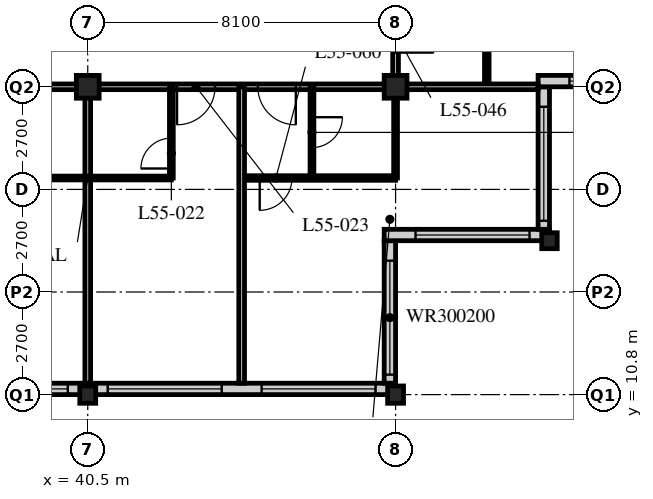
"""IFC4 building model, lengths in metres.
Left out: names, types, materials, properties, quantities, classifications, styles, units other than length and angle.
Written with IfcOpenShell. Run it as: python <this file> out.ifc"""

import sys

from ifc_helpers import new_model, si_unit, direction, frame, frame_2d, origin, origin_2d, place, context, subcontext, project, spatial, rectangle, hollow_rectangle, i_section, extrude, element, fill, save


model = new_model("IFC4")
c1 = context("Model", 3, precision=1e-05, world=origin(), true_north=direction((0.0, 1.0)))
c2 = subcontext(c1, "Body", "Model", "MODEL_VIEW")
j1 = project(units=[si_unit("LENGTHUNIT", "METRE"), si_unit("PLANEANGLEUNIT", "RADIAN")], contexts=[c1])
p1 = place(None, origin())
s1 = spatial("IfcSite", under=j1, at=p1, CompositionType="ELEMENT")
p2 = place(p1, origin())
s2 = spatial("IfcBuilding", under=s1, at=p2, CompositionType="ELEMENT")
p3 = place(p2, frame((0.0, 0.0, 213.6)))
s3 = spatial("IfcBuildingStorey", under=s2, at=p3, CompositionType="ELEMENT", Elevation=213.6)
p4 = place(p3, frame((40.5, 10.8, 0.0), z_axis=(0.0, 0.0, 1.0), x_axis=(1.0, 0.0, 0.0)))
e1 = element("IfcColumn", 1, at=p4, inside=s3, PredefinedType="COLUMN", context=c2, shape_type="SweptSolid", body=[
    extrude(i_section(OverallWidth=0.418, OverallDepth=0.456, WebThickness=0.042, FlangeThickness=0.067, FilletRadius=0.015, at=origin_2d()), origin(), (0.0, 0.0, 1.0), 3.6),
])
p5 = place(p3, frame((40.5, 18.9, 0.0), z_axis=(0.0, 0.0, 1.0), x_axis=(1.0, 0.0, 0.0)))
e2 = element("IfcColumn", 2, at=p5, inside=s3, PredefinedType="COLUMN", context=c2, shape_type="SweptSolid", body=[
    extrude(hollow_rectangle(XDim=0.6, YDim=0.6, WallThickness=0.05, at=origin_2d()), origin(), (0.0, 0.0, 1.0), 3.6),
])
p6 = place(p3, frame((48.6, 10.8, 0.0), z_axis=(0.0, 0.0, 1.0), x_axis=(1.0, 0.0, 0.0)))
e3 = element("IfcColumn", 3, at=p6, inside=s3, PredefinedType="COLUMN", context=c2, shape_type="SweptSolid", body=[
    extrude(i_section(OverallWidth=0.418, OverallDepth=0.456, WebThickness=0.042, FlangeThickness=0.067, FilletRadius=0.015, at=origin_2d()), origin(), (0.0, 0.0, 1.0), 3.6),
])
p7 = place(p3, frame((48.6, 18.9, 0.0), z_axis=(0.0, 0.0, 1.0), x_axis=(1.0, 0.0, 0.0)))
e4 = element("IfcColumn", 4, at=p7, inside=s3, PredefinedType="COLUMN", context=c2, shape_type="SweptSolid", body=[
    extrude(hollow_rectangle(XDim=0.6, YDim=0.6, WallThickness=0.05, at=origin_2d()), origin(), (0.0, 0.0, 1.0), 3.6),
])
p8 = place(p3, frame((52.65, 14.85, 0.0), z_axis=(0.0, 0.0, 1.0), x_axis=(1.0, 0.0, 0.0)))
e5 = element("IfcColumn", 5, at=p8, inside=s3, PredefinedType="COLUMN", context=c2, shape_type="SweptSolid", body=[
    extrude(i_section(OverallWidth=0.407, OverallDepth=0.419, WebThickness=0.031, FlangeThickness=0.049, FilletRadius=0.015, at=origin_2d()), origin(), (0.0, 0.0, 1.0), 3.6),
])
p9 = place(p3, frame((8.4, 10.95, 0.0), z_axis=(0.0, 0.0, 1.0), x_axis=(1.0, 0.0, 0.0)))
e6 = element("IfcWall", 6, at=p9, inside=s3, PredefinedType="SOLIDWALL", context=c2, shape_type="SweptSolid", body=[
    extrude(rectangle(XDim=40.2, YDim=0.3, at=frame_2d((20.1, 0.0))), origin(), (0.0, 0.0, 1.0), 3.39),
])
p10 = place(p9, frame((0.225, 0.0, 0.6)))
e7 = element("IfcOpeningElement", 7, at=p10, cuts=e6, PredefinedType="OPENING", context=c2, shape_type="SweptSolid", body=[
    extrude(rectangle(XDim=3.0, YDim=2.4, at=frame_2d((1.5, 1.2))), frame((0.0, 0.16, 0.0), z_axis=(0.0, -1.0, 0.0), x_axis=(1.0, 0.0, 0.0)), (0.0, 0.0, 1.0), 0.32),
])
p11 = place(p9, frame((4.275, 0.0, 0.6)))
e8 = element("IfcOpeningElement", 8, at=p11, cuts=e6, PredefinedType="OPENING", context=c2, shape_type="SweptSolid", body=[
    extrude(rectangle(XDim=3.0, YDim=2.4, at=frame_2d((1.5, 1.2))), frame((0.0, 0.16, 0.0), z_axis=(0.0, -1.0, 0.0), x_axis=(1.0, 0.0, 0.0)), (0.0, 0.0, 1.0), 0.32),
])
p12 = place(p9, frame((8.325, 0.0, 0.6)))
e9 = element("IfcOpeningElement", 9, at=p12, cuts=e6, PredefinedType="OPENING", context=c2, shape_type="SweptSolid", body=[
    extrude(rectangle(XDim=3.0, YDim=2.4, at=frame_2d((1.5, 1.2))), frame((0.0, 0.16, 0.0), z_axis=(0.0, -1.0, 0.0), x_axis=(1.0, 0.0, 0.0)), (0.0, 0.0, 1.0), 0.32),
])
p13 = place(p9, frame((12.375, 0.0, 0.6)))
e10 = element("IfcOpeningElement", 10, at=p13, cuts=e6, PredefinedType="OPENING", context=c2, shape_type="SweptSolid", body=[
    extrude(rectangle(XDim=3.0, YDim=2.4, at=frame_2d((1.5, 1.2))), frame((0.0, 0.16, 0.0), z_axis=(0.0, -1.0, 0.0), x_axis=(1.0, 0.0, 0.0)), (0.0, 0.0, 1.0), 0.32),
])
p14 = place(p9, frame((16.425, 0.0, 0.6)))
e11 = element("IfcOpeningElement", 11, at=p14, cuts=e6, PredefinedType="OPENING", context=c2, shape_type="SweptSolid", body=[
    extrude(rectangle(XDim=3.0, YDim=2.4, at=frame_2d((1.5, 1.2))), frame((0.0, 0.16, 0.0), z_axis=(0.0, -1.0, 0.0), x_axis=(1.0, 0.0, 0.0)), (0.0, 0.0, 1.0), 0.32),
])
p15 = place(p9, frame((20.475, 0.0, 0.6)))
e12 = element("IfcOpeningElement", 12, at=p15, cuts=e6, PredefinedType="OPENING", context=c2, shape_type="SweptSolid", body=[
    extrude(rectangle(XDim=3.0, YDim=2.4, at=frame_2d((1.5, 1.2))), frame((0.0, 0.16, 0.0), z_axis=(0.0, -1.0, 0.0), x_axis=(1.0, 0.0, 0.0)), (0.0, 0.0, 1.0), 0.32),
])
p16 = place(p9, frame((24.525, 0.0, 0.6)))
e13 = element("IfcOpeningElement", 13, at=p16, cuts=e6, PredefinedType="OPENING", context=c2, shape_type="SweptSolid", body=[
    extrude(rectangle(XDim=3.0, YDim=2.4, at=frame_2d((1.5, 1.2))), frame((0.0, 0.16, 0.0), z_axis=(0.0, -1.0, 0.0), x_axis=(1.0, 0.0, 0.0)), (0.0, 0.0, 1.0), 0.32),
])
p17 = place(p9, frame((28.575, 0.0, 0.6)))
e14 = element("IfcOpeningElement", 14, at=p17, cuts=e6, PredefinedType="OPENING", context=c2, shape_type="SweptSolid", body=[
    extrude(rectangle(XDim=3.0, YDim=2.4, at=frame_2d((1.5, 1.2))), frame((0.0, 0.16, 0.0), z_axis=(0.0, -1.0, 0.0), x_axis=(1.0, 0.0, 0.0)), (0.0, 0.0, 1.0), 0.32),
])
p18 = place(p9, frame((32.625, 0.0, 0.6)))
e15 = element("IfcOpeningElement", 15, at=p18, cuts=e6, PredefinedType="OPENING", context=c2, shape_type="SweptSolid", body=[
    extrude(rectangle(XDim=3.0, YDim=2.4, at=frame_2d((1.5, 1.2))), frame((0.0, 0.16, 0.0), z_axis=(0.0, -1.0, 0.0), x_axis=(1.0, 0.0, 0.0)), (0.0, 0.0, 1.0), 0.32),
])
p19 = place(p9, frame((36.675, 0.0, 0.6)))
e16 = element("IfcOpeningElement", 16, at=p19, cuts=e6, PredefinedType="OPENING", context=c2, shape_type="SweptSolid", body=[
    extrude(rectangle(XDim=3.0, YDim=2.4, at=frame_2d((1.5, 1.2))), frame((0.0, 0.16, 0.0), z_axis=(0.0, -1.0, 0.0), x_axis=(1.0, 0.0, 0.0)), (0.0, 0.0, 1.0), 0.32),
])
p20 = place(p3, frame((48.45, 11.1, 0.0), z_axis=(0.0, 0.0, 1.0), x_axis=(0.0, 1.0, 0.0)))
e17 = element("IfcWall", 17, at=p20, inside=s3, PredefinedType="SOLIDWALL", context=c2, shape_type="SweptSolid", body=[
    extrude(rectangle(XDim=3.75, YDim=0.3, at=frame_2d((1.875, 0.0))), origin(), (0.0, 0.0, 1.0), 3.39),
])
p21 = place(p20, frame((0.225, 0.0, 0.6)))
e18 = element("IfcOpeningElement", 18, at=p21, cuts=e17, PredefinedType="OPENING", context=c2, shape_type="SweptSolid", body=[
    extrude(rectangle(XDim=3.0, YDim=2.0, at=frame_2d((1.5, 1.0))), frame((0.0, 0.16, 0.0), z_axis=(0.0, -1.0, 0.0), x_axis=(1.0, 0.0, 0.0)), (0.0, 0.0, 1.0), 0.32),
])
p22 = place(p3, frame((48.3, 15.0, 0.0), z_axis=(0.0, 0.0, 1.0), x_axis=(1.0, 0.0, 0.0)))
e19 = element("IfcWall", 19, at=p22, inside=s3, PredefinedType="SOLIDWALL", context=c2, shape_type="SweptSolid", body=[
    extrude(rectangle(XDim=4.35, YDim=0.3, at=frame_2d((2.175, 0.0))), origin(), (0.0, 0.0, 1.0), 3.39),
])
p23 = place(p22, frame((0.825, 0.0, 0.6)))
e20 = element("IfcOpeningElement", 20, at=p23, cuts=e19, PredefinedType="OPENING", context=c2, shape_type="SweptSolid", body=[
    extrude(rectangle(XDim=3.0, YDim=2.0, at=frame_2d((1.5, 1.0))), frame((0.0, 0.16, 0.0), z_axis=(0.0, -1.0, 0.0), x_axis=(1.0, 0.0, 0.0)), (0.0, 0.0, 1.0), 0.32),
])
p24 = place(p3, frame((52.5, 15.15, 0.0), z_axis=(0.0, 0.0, 1.0), x_axis=(0.0, 1.0, 0.0)))
e21 = element("IfcWall", 21, at=p24, inside=s3, PredefinedType="SOLIDWALL", context=c2, shape_type="SweptSolid", body=[
    extrude(rectangle(XDim=3.75, YDim=0.3, at=frame_2d((1.875, 0.0))), origin(), (0.0, 0.0, 1.0), 3.39),
])
p25 = place(p24, frame((0.225, 0.0, 0.6)))
e22 = element("IfcOpeningElement", 22, at=p25, cuts=e21, PredefinedType="OPENING", context=c2, shape_type="SweptSolid", body=[
    extrude(rectangle(XDim=3.0, YDim=2.0, at=frame_2d((1.5, 1.0))), frame((0.0, 0.16, 0.0), z_axis=(0.0, -1.0, 0.0), x_axis=(1.0, 0.0, 0.0)), (0.0, 0.0, 1.0), 0.32),
])
p26 = place(p3, frame((52.35, 19.05, 0.0), z_axis=(0.0, 0.0, 1.0), x_axis=(1.0, 0.0, 0.0)))
e23 = element("IfcWall", 23, at=p26, inside=s3, PredefinedType="SOLIDWALL", context=c2, shape_type="SweptSolid", body=[
    extrude(rectangle(XDim=4.35, YDim=0.3, at=frame_2d((2.175, 0.0))), origin(), (0.0, 0.0, 1.0), 3.39),
])
p27 = place(p26, frame((0.825, 0.0, 0.6)))
e24 = element("IfcOpeningElement", 24, at=p27, cuts=e23, PredefinedType="OPENING", context=c2, shape_type="SweptSolid", body=[
    extrude(rectangle(XDim=3.0, YDim=2.0, at=frame_2d((1.5, 1.0))), frame((0.0, 0.16, 0.0), z_axis=(0.0, -1.0, 0.0), x_axis=(1.0, 0.0, 0.0)), (0.0, 0.0, 1.0), 0.32),
])
p28 = place(p3, frame((12.15, 18.9, 0.0), z_axis=(0.0, 0.0, 1.0), x_axis=(1.0, 0.0, 0.0)))
e25 = element("IfcWall", 25, at=p28, inside=s3, PredefinedType="PARTITIONING", context=c2, shape_type="SweptSolid", body=[
    extrude(rectangle(XDim=36.45, YDim=0.15, at=frame_2d((18.225, 0.0))), origin(), (0.0, 0.0, 1.0), 2.778),
])
p29 = place(p28, frame((4.95, 0.0, 0.0)))
e26 = element("IfcOpeningElement", 26, at=p29, cuts=e25, PredefinedType="OPENING", context=c2, shape_type="SweptSolid", body=[
    extrude(rectangle(XDim=1.0, YDim=2.1, at=frame_2d((0.5, 1.05))), frame((0.0, 0.085, 0.0), z_axis=(0.0, -1.0, 0.0), x_axis=(1.0, 0.0, 0.0)), (0.0, 0.0, 1.0), 0.17),
])
p30 = place(p28, frame((22.6, 0.0, 0.0)))
e27 = element("IfcOpeningElement", 27, at=p30, cuts=e25, PredefinedType="OPENING", context=c2, shape_type="SweptSolid", body=[
    extrude(rectangle(XDim=1.0, YDim=2.1, at=frame_2d((0.5, 1.05))), frame((0.0, 0.085, 0.0), z_axis=(0.0, -1.0, 0.0), x_axis=(1.0, 0.0, 0.0)), (0.0, 0.0, 1.0), 0.17),
])
p31 = place(p28, frame((25.0, 0.0, 0.0)))
e28 = element("IfcOpeningElement", 28, at=p31, cuts=e25, PredefinedType="OPENING", context=c2, shape_type="SweptSolid", body=[
    extrude(rectangle(XDim=1.0, YDim=2.1, at=frame_2d((0.5, 1.05))), frame((0.0, 0.085, 0.0), z_axis=(0.0, -1.0, 0.0), x_axis=(1.0, 0.0, 0.0)), (0.0, 0.0, 1.0), 0.17),
])
p32 = place(p28, frame((30.7, 0.0, 0.0)))
e29 = element("IfcOpeningElement", 29, at=p32, cuts=e25, PredefinedType="OPENING", context=c2, shape_type="SweptSolid", body=[
    extrude(rectangle(XDim=1.0, YDim=2.1, at=frame_2d((0.5, 1.05))), frame((0.0, 0.085, 0.0), z_axis=(0.0, -1.0, 0.0), x_axis=(1.0, 0.0, 0.0)), (0.0, 0.0, 1.0), 0.17),
])
p33 = place(p28, frame((1.525, 0.0, 0.0)))
e30 = element("IfcOpeningElement", 30, at=p33, cuts=e25, PredefinedType="OPENING", context=c2, shape_type="SweptSolid", body=[
    extrude(rectangle(XDim=1.0, YDim=2.1, at=frame_2d((0.5, 1.05))), frame((0.0, 0.085, 0.0), z_axis=(0.0, -1.0, 0.0), x_axis=(1.0, 0.0, 0.0)), (0.0, 0.0, 1.0), 0.17),
])
p34 = place(p28, frame((32.825, 0.0, 0.0)))
e31 = element("IfcOpeningElement", 31, at=p34, cuts=e25, PredefinedType="OPENING", context=c2, shape_type="SweptSolid", body=[
    extrude(rectangle(XDim=1.0, YDim=2.1, at=frame_2d((0.5, 1.05))), frame((0.0, 0.085, 0.0), z_axis=(0.0, -1.0, 0.0), x_axis=(1.0, 0.0, 0.0)), (0.0, 0.0, 1.0), 0.17),
])
p35 = place(p3, frame((48.6, 18.9, 0.0), z_axis=(0.0, 0.0, 1.0), x_axis=(0.0, 1.0, 0.0)))
e32 = element("IfcWall", 32, at=p35, inside=s3, PredefinedType="PARTITIONING", context=c2, shape_type="SweptSolid", body=[
    extrude(rectangle(XDim=24.3, YDim=0.15, at=frame_2d((12.15, 0.0))), origin(), (0.0, 0.0, 1.0), 2.778),
])
p36 = place(p35, frame((0.9, 0.0, 0.0)))
e33 = element("IfcOpeningElement", 33, at=p36, cuts=e32, PredefinedType="OPENING", context=c2, shape_type="SweptSolid", body=[
    extrude(rectangle(XDim=1.0, YDim=2.1, at=frame_2d((0.5, 1.05))), frame((0.0, 0.085, 0.0), z_axis=(0.0, -1.0, 0.0), x_axis=(1.0, 0.0, 0.0)), (0.0, 0.0, 1.0), 0.17),
])
p37 = place(p35, frame((20.95, 0.0, 0.0)))
e34 = element("IfcOpeningElement", 34, at=p37, cuts=e32, PredefinedType="OPENING", context=c2, shape_type="SweptSolid", body=[
    extrude(rectangle(XDim=1.0, YDim=2.1, at=frame_2d((0.5, 1.05))), frame((0.0, 0.085, 0.0), z_axis=(0.0, -1.0, 0.0), x_axis=(1.0, 0.0, 0.0)), (0.0, 0.0, 1.0), 0.17),
])
p38 = place(p3, frame((38.3, 16.5, 0.0), z_axis=(0.0, 0.0, 1.0), x_axis=(1.0, 0.0, 0.0)))
e35 = element("IfcWall", 35, at=p38, inside=s3, PredefinedType="PARTITIONING", context=c2, shape_type="SweptSolid", body=[
    extrude(rectangle(XDim=4.4, YDim=0.1, at=frame_2d((2.2, 0.0))), origin(), (0.0, 0.0, 1.0), 3.39),
])
p39 = place(p3, frame((40.5, 18.9, 0.0), z_axis=(0.0, 0.0, 1.0), x_axis=(0.0, -1.0, 0.0)))
e36 = element("IfcWall", 36, at=p39, inside=s3, PredefinedType="PARTITIONING", context=c2, shape_type="SweptSolid", body=[
    extrude(rectangle(XDim=7.8, YDim=0.15, at=frame_2d((3.9, 0.0))), origin(), (0.0, 0.0, 1.0), 2.778),
])
p40 = place(p3, frame((42.7, 18.9, 0.0), z_axis=(0.0, 0.0, 1.0), x_axis=(0.0, -1.0, 0.0)))
e37 = element("IfcWall", 37, at=p40, inside=s3, PredefinedType="PARTITIONING", context=c2, shape_type="SweptSolid", body=[
    extrude(rectangle(XDim=2.4, YDim=0.1, at=frame_2d((1.2, 0.0))), origin(), (0.0, 0.0, 1.0), 3.39),
])
p41 = place(p40, frame((1.35, 0.0, 0.0)))
e38 = element("IfcOpeningElement", 38, at=p41, cuts=e37, PredefinedType="OPENING", context=c2, shape_type="SweptSolid", body=[
    extrude(rectangle(XDim=0.8, YDim=2.1, at=frame_2d((0.4, 1.05))), frame((0.0, 0.06, 0.0), z_axis=(0.0, -1.0, 0.0), x_axis=(1.0, 0.0, 0.0)), (0.0, 0.0, 1.0), 0.12),
])
p42 = place(p3, frame((51.0, 18.9, 0.0), z_axis=(0.0, 0.0, 1.0), x_axis=(0.0, 1.0, 0.0)))
e39 = element("IfcWall", 39, at=p42, inside=s3, PredefinedType="PARTITIONING", context=c2, shape_type="SweptSolid", body=[
    extrude(rectangle(XDim=20.25, YDim=0.12, at=frame_2d((10.125, 0.0))), origin(), (0.0, 0.0, 1.0), 3.39),
])
p43 = place(p42, frame((0.975, 0.0, 0.0)))
e40 = element("IfcOpeningElement", 40, at=p43, cuts=e39, PredefinedType="OPENING", context=c2, shape_type="SweptSolid", body=[
    extrude(rectangle(XDim=0.85, YDim=2.1, at=frame_2d((0.425, 1.05))), frame((0.0, 0.07, 0.0), z_axis=(0.0, -1.0, 0.0), x_axis=(1.0, 0.0, 0.0)), (0.0, 0.0, 1.0), 0.14),
])
p44 = place(p42, frame((8.425, 0.0, 0.0)))
e41 = element("IfcOpeningElement", 41, at=p44, cuts=e39, PredefinedType="OPENING", context=c2, shape_type="SweptSolid", body=[
    extrude(rectangle(XDim=0.85, YDim=2.1, at=frame_2d((0.425, 1.05))), frame((0.0, 0.07, 0.0), z_axis=(0.0, -1.0, 0.0), x_axis=(1.0, 0.0, 0.0)), (0.0, 0.0, 1.0), 0.14),
])
p45 = place(p42, frame((12.475, 0.0, 0.0)))
e42 = element("IfcOpeningElement", 42, at=p45, cuts=e39, PredefinedType="OPENING", context=c2, shape_type="SweptSolid", body=[
    extrude(rectangle(XDim=0.85, YDim=2.1, at=frame_2d((0.425, 1.05))), frame((0.0, 0.07, 0.0), z_axis=(0.0, -1.0, 0.0), x_axis=(1.0, 0.0, 0.0)), (0.0, 0.0, 1.0), 0.14),
])
p46 = place(p42, frame((16.525, 0.0, 0.0)))
e43 = element("IfcOpeningElement", 43, at=p46, cuts=e39, PredefinedType="OPENING", context=c2, shape_type="SweptSolid", body=[
    extrude(rectangle(XDim=0.85, YDim=2.1, at=frame_2d((0.425, 1.05))), frame((0.0, 0.07, 0.0), z_axis=(0.0, -1.0, 0.0), x_axis=(1.0, 0.0, 0.0)), (0.0, 0.0, 1.0), 0.14),
])
p47 = place(p3, frame((44.55, 16.5, 0.0), z_axis=(0.0, 0.0, 1.0), x_axis=(1.0, 0.0, 0.0)))
e44 = element("IfcWall", 44, at=p47, inside=s3, PredefinedType="PARTITIONING", context=c2, shape_type="SweptSolid", body=[
    extrude(rectangle(XDim=4.05, YDim=0.12, at=frame_2d((2.025, 0.0))), origin(), (0.0, 0.0, 1.0), 3.39),
])
p48 = place(p47, frame((0.475, 0.0, 0.0)))
e45 = element("IfcOpeningElement", 45, at=p48, cuts=e44, PredefinedType="OPENING", context=c2, shape_type="SweptSolid", body=[
    extrude(rectangle(XDim=0.85, YDim=2.1, at=frame_2d((0.425, 1.05))), frame((0.0, 0.07, 0.0), z_axis=(0.0, -1.0, 0.0), x_axis=(1.0, 0.0, 0.0)), (0.0, 0.0, 1.0), 0.14),
])
p49 = place(p3, frame((46.4, 18.9, 0.0), z_axis=(0.0, 0.0, 1.0), x_axis=(0.0, -1.0, 0.0)))
e46 = element("IfcWall", 46, at=p49, inside=s3, PredefinedType="PARTITIONING", context=c2, shape_type="SweptSolid", body=[
    extrude(rectangle(XDim=2.4, YDim=0.1, at=frame_2d((1.2, 0.0))), origin(), (0.0, 0.0, 1.0), 3.39),
])
p50 = place(p49, frame((0.8, 0.0, 0.0)))
e47 = element("IfcOpeningElement", 47, at=p50, cuts=e46, PredefinedType="OPENING", context=c2, shape_type="SweptSolid", body=[
    extrude(rectangle(XDim=0.8, YDim=2.1, at=frame_2d((0.4, 1.05))), frame((0.0, 0.06, 0.0), z_axis=(0.0, -1.0, 0.0), x_axis=(1.0, 0.0, 0.0)), (0.0, 0.0, 1.0), 0.12),
])
p51 = place(p3, frame((48.6, 18.9, 0.0), z_axis=(0.0, 0.0, 1.0), x_axis=(0.0, -1.0, 0.0)))
e48 = element("IfcWall", 48, at=p51, inside=s3, PredefinedType="PARTITIONING", context=c2, shape_type="SweptSolid", body=[
    extrude(rectangle(XDim=2.4, YDim=0.1, at=frame_2d((1.2, 0.0))), origin(), (0.0, 0.0, 1.0), 2.778),
])
p52 = place(p3, frame((48.6, 18.9, 0.0), z_axis=(0.0, 0.0, 1.0), x_axis=(1.0, 0.0, 0.0)))
e49 = element("IfcWall", 49, at=p52, inside=s3, PredefinedType="PARTITIONING", context=c2, shape_type="SweptSolid", body=[
    extrude(rectangle(XDim=3.75, YDim=0.15, at=frame_2d((1.875, 0.0))), origin(), (0.0, 0.0, 1.0), 2.778),
])
p53 = place(p3, frame((44.55, 18.9, 0.0), z_axis=(0.0, 0.0, 1.0), x_axis=(0.0, -1.0, 0.0)))
e50 = element("IfcWall", 50, at=p53, inside=s3, PredefinedType="PARTITIONING", context=c2, shape_type="SweptSolid", body=[
    extrude(rectangle(XDim=7.8, YDim=0.15, at=frame_2d((3.9, 0.0))), origin(), (0.0, 0.0, 1.0), 3.39),
])
p54 = place(p17, origin())
e51 = element("IfcWindow", 51, at=p54, inside=s3, PartitioningType="SINGLE_PANEL", PredefinedType="WINDOW", context=c2, shape_type="SweptSolid", body=[
    extrude(rectangle(XDim=3.0, YDim=2.4, at=frame_2d((1.5, 1.2))), frame((0.0, 0.03, 0.0), z_axis=(0.0, -1.0, 0.0), x_axis=(1.0, 0.0, 0.0)), (0.0, 0.0, 1.0), 0.06),
])
fill(e14, e51)
p55 = place(p18, origin())
e52 = element("IfcWindow", 52, at=p55, inside=s3, PartitioningType="SINGLE_PANEL", PredefinedType="WINDOW", context=c2, shape_type="SweptSolid", body=[
    extrude(rectangle(XDim=3.0, YDim=2.4, at=frame_2d((1.5, 1.2))), frame((0.0, 0.03, 0.0), z_axis=(0.0, -1.0, 0.0), x_axis=(1.0, 0.0, 0.0)), (0.0, 0.0, 1.0), 0.06),
])
fill(e15, e52)
p56 = place(p19, origin())
e53 = element("IfcWindow", 53, at=p56, inside=s3, PartitioningType="SINGLE_PANEL", PredefinedType="WINDOW", context=c2, shape_type="SweptSolid", body=[
    extrude(rectangle(XDim=3.0, YDim=2.4, at=frame_2d((1.5, 1.2))), frame((0.0, 0.03, 0.0), z_axis=(0.0, -1.0, 0.0), x_axis=(1.0, 0.0, 0.0)), (0.0, 0.0, 1.0), 0.06),
])
fill(e16, e53)
p57 = place(p21, origin())
e54 = element("IfcWindow", 54, at=p57, inside=s3, PartitioningType="SINGLE_PANEL", PredefinedType="WINDOW", context=c2, shape_type="SweptSolid", body=[
    extrude(rectangle(XDim=3.0, YDim=2.0, at=frame_2d((1.5, 1.0))), frame((0.0, 0.03, 0.0), z_axis=(0.0, -1.0, 0.0), x_axis=(1.0, 0.0, 0.0)), (0.0, 0.0, 1.0), 0.06),
])
fill(e18, e54)
p58 = place(p23, origin())
e55 = element("IfcWindow", 55, at=p58, inside=s3, PartitioningType="SINGLE_PANEL", PredefinedType="WINDOW", context=c2, shape_type="SweptSolid", body=[
    extrude(rectangle(XDim=3.0, YDim=2.0, at=frame_2d((1.5, 1.0))), frame((0.0, 0.03, 0.0), z_axis=(0.0, -1.0, 0.0), x_axis=(1.0, 0.0, 0.0)), (0.0, 0.0, 1.0), 0.06),
])
fill(e20, e55)
p59 = place(p25, origin())
e56 = element("IfcWindow", 56, at=p59, inside=s3, PartitioningType="SINGLE_PANEL", PredefinedType="WINDOW", context=c2, shape_type="SweptSolid", body=[
    extrude(rectangle(XDim=3.0, YDim=2.0, at=frame_2d((1.5, 1.0))), frame((0.0, 0.03, 0.0), z_axis=(0.0, -1.0, 0.0), x_axis=(1.0, 0.0, 0.0)), (0.0, 0.0, 1.0), 0.06),
])
fill(e22, e56)
p60 = place(p27, origin())
e57 = element("IfcWindow", 57, at=p60, inside=s3, PartitioningType="SINGLE_PANEL", PredefinedType="WINDOW", context=c2, shape_type="SweptSolid", body=[
    extrude(rectangle(XDim=3.0, YDim=2.0, at=frame_2d((1.5, 1.0))), frame((0.0, 0.03, 0.0), z_axis=(0.0, -1.0, 0.0), x_axis=(1.0, 0.0, 0.0)), (0.0, 0.0, 1.0), 0.06),
])
fill(e24, e57)
p61 = place(p41, origin())
e58 = element("IfcDoor", 58, at=p61, inside=s3, OperationType="SINGLE_SWING_LEFT", PredefinedType="DOOR", context=c2, shape_type="SweptSolid", body=[
    extrude(rectangle(XDim=0.8, YDim=2.1, at=frame_2d((0.4, 1.05))), frame((0.0, 0.025, 0.0), z_axis=(0.0, -1.0, 0.0), x_axis=(1.0, 0.0, 0.0)), (0.0, 0.0, 1.0), 0.05),
])
fill(e38, e58)
p62 = place(p32, origin())
e59 = element("IfcDoor", 59, at=p62, inside=s3, OperationType="SINGLE_SWING_RIGHT", PredefinedType="DOOR", context=c2, shape_type="SweptSolid", body=[
    extrude(rectangle(XDim=1.0, YDim=2.1, at=frame_2d((0.5, 1.05))), frame((0.0, 0.025, 0.0), z_axis=(0.0, -1.0, 0.0), x_axis=(1.0, 0.0, 0.0)), (0.0, 0.0, 1.0), 0.05),
])
fill(e29, e59)
p63 = place(p36, origin())
e60 = element("IfcDoor", 60, at=p63, inside=s3, OperationType="SINGLE_SWING_RIGHT", PredefinedType="DOOR", context=c2, shape_type="SweptSolid", body=[
    extrude(rectangle(XDim=1.0, YDim=2.1, at=frame_2d((0.5, 1.05))), frame((0.0, 0.025, 0.0), z_axis=(0.0, -1.0, 0.0), x_axis=(1.0, 0.0, 0.0)), (0.0, 0.0, 1.0), 0.05),
])
fill(e33, e60)
p64 = place(p50, origin())
e61 = element("IfcDoor", 61, at=p64, inside=s3, OperationType="SINGLE_SWING_LEFT", PredefinedType="DOOR", context=c2, shape_type="SweptSolid", body=[
    extrude(rectangle(XDim=0.8, YDim=2.1, at=frame_2d((0.4, 1.05))), frame((0.0, 0.025, 0.0), z_axis=(0.0, -1.0, 0.0), x_axis=(1.0, 0.0, 0.0)), (0.0, 0.0, 1.0), 0.05),
])
fill(e47, e61)
p65 = place(p34, origin())
e62 = element("IfcDoor", 62, at=p65, inside=s3, OperationType="SINGLE_SWING_LEFT", PredefinedType="DOOR", context=c2, shape_type="SweptSolid", body=[
    extrude(rectangle(XDim=1.0, YDim=2.1, at=frame_2d((0.5, 1.05))), frame((0.0, 0.025, 0.0), z_axis=(0.0, -1.0, 0.0), x_axis=(1.0, 0.0, 0.0)), (0.0, 0.0, 1.0), 0.05),
])
fill(e31, e62)
p66 = place(p48, origin())
e63 = element("IfcDoor", 63, at=p66, inside=s3, OperationType="SINGLE_SWING_RIGHT", PredefinedType="DOOR", context=c2, shape_type="SweptSolid", body=[
    extrude(rectangle(XDim=0.85, YDim=2.1, at=frame_2d((0.425, 1.05))), frame((0.0, 0.025, 0.0), z_axis=(0.0, -1.0, 0.0), x_axis=(1.0, 0.0, 0.0)), (0.0, 0.0, 1.0), 0.05),
])
fill(e45, e63)
save(model, sys.argv[1])
